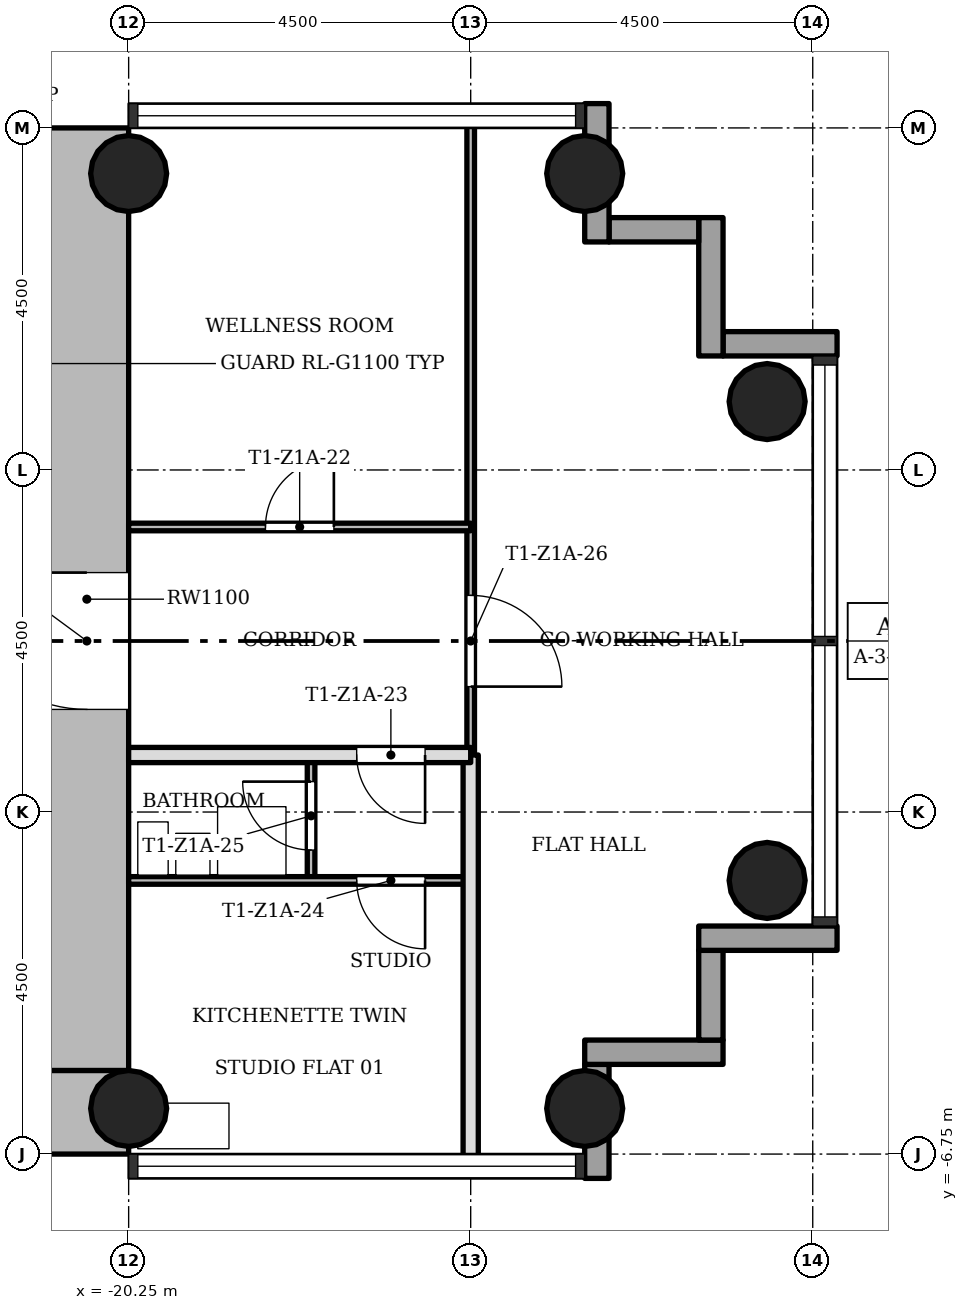
"""IFC4 building model, lengths in metres.
Left out: names, types, materials, properties, quantities, classifications, styles, units other than length and angle.
Written with IfcOpenShell. Run it as: python <this file> out.ifc"""

import sys

from ifc_helpers import new_model, si_unit, direction, frame, frame_2d, origin, origin_2d, place, context, subcontext, project, spatial, rectangle, hollow_circle, extrude, element, fill, save


model = new_model("IFC4")
c1 = context("Model", 3, precision=1e-05, world=origin(), true_north=direction((0.0, 1.0)))
c2 = subcontext(c1, "Body", "Model", "MODEL_VIEW")
j1 = project(units=[si_unit("LENGTHUNIT", "METRE"), si_unit("PLANEANGLEUNIT", "RADIAN")], contexts=[c1])
p1 = place(None, origin())
s1 = spatial("IfcSite", under=j1, at=p1, CompositionType="ELEMENT")
p2 = place(p1, origin())
s2 = spatial("IfcBuilding", under=s1, at=p2, CompositionType="ELEMENT")
p3 = place(p2, frame((0.0, 0.0, 27.9)))
s3 = spatial("IfcBuildingStorey", under=s2, at=p3, CompositionType="ELEMENT", Elevation=27.9)
p4 = place(p3, frame((-28.15, -6.2, 0.0), z_axis=(0.0, 0.0, 1.0), x_axis=(1.0, 0.0, 0.0)))
e1 = element("IfcWall", 1, at=p4, inside=s3, PredefinedType="SHEAR", context=c2, shape_type="SweptSolid", body=[
    extrude(rectangle(XDim=7.9, YDim=1.1, at=frame_2d((3.95, 0.0))), origin(), (0.0, 0.0, 1.0), 3.4),
])
p5 = place(p3, frame((-20.8, -5.65, 0.0), z_axis=(0.0, 0.0, 1.0), x_axis=(0.0, 1.0, 0.0)))
e2 = element("IfcWall", 2, at=p5, inside=s3, PredefinedType="SHEAR", context=c2, shape_type="SweptSolid", body=[
    extrude(rectangle(XDim=12.4, YDim=1.1, at=frame_2d((6.2, 0.0))), origin(), (0.0, 0.0, 1.0), 3.4),
])
p6 = place(p5, frame((4.75, 0.0, 0.0)))
e3 = element("IfcOpeningElement", 3, at=p6, cuts=e2, PredefinedType="OPENING", context=c2, shape_type="SweptSolid", body=[
    extrude(rectangle(XDim=1.8, YDim=2.1, at=frame_2d((0.9, 1.05))), frame((0.0, 0.56, 0.0), z_axis=(0.0, -1.0, 0.0), x_axis=(1.0, 0.0, 0.0)), (0.0, 0.0, 1.0), 1.12),
])
for number, where, z_axis, x_axis in (
    (4, (-20.25, -6.15, 0.0), (0.0, 0.0, 1.0), (1.0, 0.0, 0.0)),
    (5, (-20.25, 6.15, 0.0), (0.0, 0.0, 1.0), (1.0, 0.0, 0.0)),
    (6, (-14.25, -6.15, 0.0), (0.0, 0.0, 1.0), (1.0, 0.0, 0.0)),
    (7, (-14.25, 6.15, 0.0), (0.0, 0.0, 1.0), (1.0, 0.0, 0.0)),
    (8, (-11.85, -3.15, 0.0), (0.0, 0.0, 1.0), (1.0, 0.0, 0.0)),
    (9, (-11.85, 3.15, 0.0), (0.0, 0.0, 1.0), (1.0, 0.0, 0.0)),
):
    element("IfcColumn", number, at=place(p3, frame(where, z_axis=z_axis, x_axis=x_axis)), inside=s3, PredefinedType="COLUMN", context=c2, shape_type="SweptSolid", body=[
        extrude(hollow_circle(Radius=0.5, WallThickness=0.036, at=origin_2d()), origin(), (0.0, 0.0, 1.0), 3.4),
    ])
p7 = place(p3, frame((-14.09, -7.07, -0.3), z_axis=(0.0, 0.0, 1.0), x_axis=(0.0, 1.0, 0.0)))
e10 = element("IfcWall", 10, at=p7, inside=s3, PredefinedType="STANDARD", context=c2, shape_type="SweptSolid", body=[
    extrude(rectangle(XDim=1.5, YDim=0.32, at=frame_2d((0.75, 0.0))), origin(), (0.0, 0.0, 1.0), 3.4),
])
p8 = place(p3, frame((-14.25, -5.41, -0.3), z_axis=(0.0, 0.0, 1.0), x_axis=(1.0, 0.0, 0.0)))
e11 = element("IfcWall", 11, at=p8, inside=s3, PredefinedType="STANDARD", context=c2, shape_type="SweptSolid", body=[
    extrude(rectangle(XDim=1.82, YDim=0.32, at=frame_2d((0.91, 0.0))), origin(), (0.0, 0.0, 1.0), 3.4),
])
p9 = place(p3, frame((-12.59, -5.25, -0.3), z_axis=(0.0, 0.0, 1.0), x_axis=(0.0, 1.0, 0.0)))
e12 = element("IfcWall", 12, at=p9, inside=s3, PredefinedType="STANDARD", context=c2, shape_type="SweptSolid", body=[
    extrude(rectangle(XDim=1.18, YDim=0.32, at=frame_2d((0.59, 0.0))), origin(), (0.0, 0.0, 1.0), 3.4),
])
p10 = place(p3, frame((-12.75, -3.91, -0.3), z_axis=(0.0, 0.0, 1.0), x_axis=(1.0, 0.0, 0.0)))
e13 = element("IfcWall", 13, at=p10, inside=s3, PredefinedType="STANDARD", context=c2, shape_type="SweptSolid", body=[
    extrude(rectangle(XDim=1.82, YDim=0.32, at=frame_2d((0.91, 0.0))), origin(), (0.0, 0.0, 1.0), 3.4),
])
p11 = place(p3, frame((-10.93, 3.91, -0.3), z_axis=(0.0, 0.0, 1.0), x_axis=(-1.0, 0.0, 0.0)))
e14 = element("IfcWall", 14, at=p11, inside=s3, PredefinedType="STANDARD", context=c2, shape_type="SweptSolid", body=[
    extrude(rectangle(XDim=1.5, YDim=0.32, at=frame_2d((0.75, 0.0))), origin(), (0.0, 0.0, 1.0), 3.4),
])
p12 = place(p3, frame((-12.59, 3.75, -0.3), z_axis=(0.0, 0.0, 1.0), x_axis=(0.0, 1.0, 0.0)))
e15 = element("IfcWall", 15, at=p12, inside=s3, PredefinedType="STANDARD", context=c2, shape_type="SweptSolid", body=[
    extrude(rectangle(XDim=1.82, YDim=0.32, at=frame_2d((0.91, 0.0))), origin(), (0.0, 0.0, 1.0), 3.4),
])
p13 = place(p3, frame((-12.75, 5.41, -0.3), z_axis=(0.0, 0.0, 1.0), x_axis=(-1.0, 0.0, 0.0)))
e16 = element("IfcWall", 16, at=p13, inside=s3, PredefinedType="STANDARD", context=c2, shape_type="SweptSolid", body=[
    extrude(rectangle(XDim=1.18, YDim=0.32, at=frame_2d((0.59, 0.0))), origin(), (0.0, 0.0, 1.0), 3.4),
])
p14 = place(p3, frame((-14.09, 5.25, -0.3), z_axis=(0.0, 0.0, 1.0), x_axis=(0.0, 1.0, 0.0)))
e17 = element("IfcWall", 17, at=p14, inside=s3, PredefinedType="STANDARD", context=c2, shape_type="SweptSolid", body=[
    extrude(rectangle(XDim=1.82, YDim=0.32, at=frame_2d((0.91, 0.0))), origin(), (0.0, 0.0, 1.0), 3.4),
])
p15 = place(p3, frame((-17.85, -3.15, 0.0), z_axis=(0.0, 0.0, 1.0), x_axis=(0.0, 1.0, 0.0)))
e18 = element("IfcWall", 18, at=p15, inside=s3, PredefinedType="PARTITIONING", context=c2, shape_type="SweptSolid", body=[
    extrude(rectangle(XDim=1.65, YDim=0.1, at=frame_2d((0.825, 0.0))), origin(), (0.0, 0.0, 1.0), 3.0),
])
p16 = place(p15, frame((0.4, 0.0, 0.0)))
e19 = element("IfcOpeningElement", 19, at=p16, cuts=e18, PredefinedType="OPENING", context=c2, shape_type="SweptSolid", body=[
    extrude(rectangle(XDim=0.9, YDim=2.1, at=frame_2d((0.45, 1.05))), frame((0.0, 0.06, 0.0), z_axis=(0.0, -1.0, 0.0), x_axis=(1.0, 0.0, 0.0)), (0.0, 0.0, 1.0), 0.12),
])
p17 = place(p3, frame((-15.75, -1.5, 0.0), z_axis=(0.0, 0.0, 1.0), x_axis=(0.0, 1.0, 0.0)))
e20 = element("IfcWall", 20, at=p17, inside=s3, PredefinedType="PARTITIONING", context=c2, shape_type="SweptSolid", body=[
    extrude(rectangle(XDim=8.35, YDim=0.1, at=frame_2d((4.175, 0.0))), origin(), (0.0, 0.0, 1.0), 3.0),
])
p18 = place(p17, frame((0.9, 0.0, 0.0)))
e21 = element("IfcOpeningElement", 21, at=p18, cuts=e20, PredefinedType="OPENING", context=c2, shape_type="SweptSolid", body=[
    extrude(rectangle(XDim=1.2, YDim=2.1, at=frame_2d((0.6, 1.05))), frame((0.0, 0.06, 0.0), z_axis=(0.0, -1.0, 0.0), x_axis=(1.0, 0.0, 0.0)), (0.0, 0.0, 1.0), 0.12),
])
p19 = place(p3, frame((-15.75, -6.85, 0.0), z_axis=(0.0, 0.0, 1.0), x_axis=(0.0, 1.0, 0.0)))
e22 = element("IfcWall", 22, at=p19, inside=s3, PredefinedType="SOLIDWALL", context=c2, shape_type="SweptSolid", body=[
    extrude(rectangle(XDim=5.35, YDim=0.2, at=frame_2d((2.675, 0.0))), origin(), (0.0, 0.0, 1.0), 3.0),
])
p20 = place(p3, frame((-20.25, -3.15, 0.0), z_axis=(0.0, 0.0, 1.0), x_axis=(1.0, 0.0, 0.0)))
e23 = element("IfcWall", 23, at=p20, inside=s3, PredefinedType="PARTITIONING", context=c2, shape_type="SweptSolid", body=[
    extrude(rectangle(XDim=4.5, YDim=0.1, at=frame_2d((2.25, 0.0))), origin(), (0.0, 0.0, 1.0), 3.0),
])
p21 = place(p20, frame((3.0, 0.0, 0.0)))
e24 = element("IfcOpeningElement", 24, at=p21, cuts=e23, PredefinedType="OPENING", context=c2, shape_type="SweptSolid", body=[
    extrude(rectangle(XDim=0.9, YDim=2.1, at=frame_2d((0.45, 1.05))), frame((0.0, 0.06, 0.0), z_axis=(0.0, -1.0, 0.0), x_axis=(1.0, 0.0, 0.0)), (0.0, 0.0, 1.0), 0.12),
])
p22 = place(p3, frame((-20.25, -1.5, 0.0), z_axis=(0.0, 0.0, 1.0), x_axis=(1.0, 0.0, 0.0)))
e25 = element("IfcWall", 25, at=p22, inside=s3, PredefinedType="SOLIDWALL", context=c2, shape_type="SweptSolid", body=[
    extrude(rectangle(XDim=4.5, YDim=0.2, at=frame_2d((2.25, 0.0))), origin(), (0.0, 0.0, 1.0), 3.0),
])
p23 = place(p22, frame((3.0, 0.0, 0.0)))
e26 = element("IfcOpeningElement", 26, at=p23, cuts=e25, PredefinedType="OPENING", context=c2, shape_type="SweptSolid", body=[
    extrude(rectangle(XDim=0.9, YDim=2.1, at=frame_2d((0.45, 1.05))), frame((0.0, 0.11, 0.0), z_axis=(0.0, -1.0, 0.0), x_axis=(1.0, 0.0, 0.0)), (0.0, 0.0, 1.0), 0.22),
])
p24 = place(p3, frame((-20.25, 1.5, 0.0), z_axis=(0.0, 0.0, 1.0), x_axis=(1.0, 0.0, 0.0)))
e27 = element("IfcWall", 27, at=p24, inside=s3, PredefinedType="PARTITIONING", context=c2, shape_type="SweptSolid", body=[
    extrude(rectangle(XDim=4.5, YDim=0.1, at=frame_2d((2.25, 0.0))), origin(), (0.0, 0.0, 1.0), 3.0),
])
p25 = place(p24, frame((1.8, 0.0, 0.0)))
e28 = element("IfcOpeningElement", 28, at=p25, cuts=e27, PredefinedType="OPENING", context=c2, shape_type="SweptSolid", body=[
    extrude(rectangle(XDim=0.9, YDim=2.1, at=frame_2d((0.45, 1.05))), frame((0.0, 0.06, 0.0), z_axis=(0.0, -1.0, 0.0), x_axis=(1.0, 0.0, 0.0)), (0.0, 0.0, 1.0), 0.12),
])
p26 = place(p25, origin())
e29 = element("IfcDoor", 29, at=p26, inside=s3, OperationType="SINGLE_SWING_LEFT", PredefinedType="DOOR", context=c2, shape_type="SweptSolid", body=[
    extrude(rectangle(XDim=0.9, YDim=2.1, at=frame_2d((0.45, 1.05))), frame((0.0, 0.025, 0.0), z_axis=(0.0, -1.0, 0.0), x_axis=(1.0, 0.0, 0.0)), (0.0, 0.0, 1.0), 0.05),
])
fill(e28, e29)
p27 = place(p23, origin())
e30 = element("IfcDoor", 30, at=p27, inside=s3, OperationType="SINGLE_SWING_RIGHT", PredefinedType="DOOR", context=c2, shape_type="SweptSolid", body=[
    extrude(rectangle(XDim=0.9, YDim=2.1, at=frame_2d((0.45, 1.05))), frame((0.0, 0.025, 0.0), z_axis=(0.0, -1.0, 0.0), x_axis=(1.0, 0.0, 0.0)), (0.0, 0.0, 1.0), 0.05),
])
fill(e26, e30)
p28 = place(p21, origin())
e31 = element("IfcDoor", 31, at=p28, inside=s3, OperationType="SINGLE_SWING_RIGHT", PredefinedType="DOOR", context=c2, shape_type="SweptSolid", body=[
    extrude(rectangle(XDim=0.9, YDim=2.1, at=frame_2d((0.45, 1.05))), frame((0.0, 0.025, 0.0), z_axis=(0.0, -1.0, 0.0), x_axis=(1.0, 0.0, 0.0)), (0.0, 0.0, 1.0), 0.05),
])
fill(e24, e31)
p29 = place(p16, origin())
e32 = element("IfcDoor", 32, at=p29, inside=s3, OperationType="SINGLE_SWING_LEFT", PredefinedType="DOOR", context=c2, shape_type="SweptSolid", body=[
    extrude(rectangle(XDim=0.9, YDim=2.1, at=frame_2d((0.45, 1.05))), frame((0.0, 0.025, 0.0), z_axis=(0.0, -1.0, 0.0), x_axis=(1.0, 0.0, 0.0)), (0.0, 0.0, 1.0), 0.05),
])
fill(e19, e32)
p30 = place(p18, origin())
e33 = element("IfcDoor", 33, at=p30, inside=s3, OperationType="SINGLE_SWING_LEFT", PredefinedType="DOOR", context=c2, shape_type="SweptSolid", body=[
    extrude(rectangle(XDim=1.2, YDim=2.1, at=frame_2d((0.6, 1.05))), frame((0.0, 0.025, 0.0), z_axis=(0.0, -1.0, 0.0), x_axis=(1.0, 0.0, 0.0)), (0.0, 0.0, 1.0), 0.05),
])
fill(e21, e33)
p31 = place(p6, origin())
e34 = element("IfcDoor", 34, at=p31, inside=s3, OperationType="SINGLE_SWING_LEFT", PredefinedType="DOOR", context=c2, shape_type="SweptSolid", body=[
    extrude(rectangle(XDim=1.8, YDim=2.1, at=frame_2d((0.9, 1.05))), frame((0.0, 0.025, 0.0), z_axis=(0.0, -1.0, 0.0), x_axis=(1.0, 0.0, 0.0)), (0.0, 0.0, 1.0), 0.05),
])
fill(e3, e34)
save(model, sys.argv[1])
